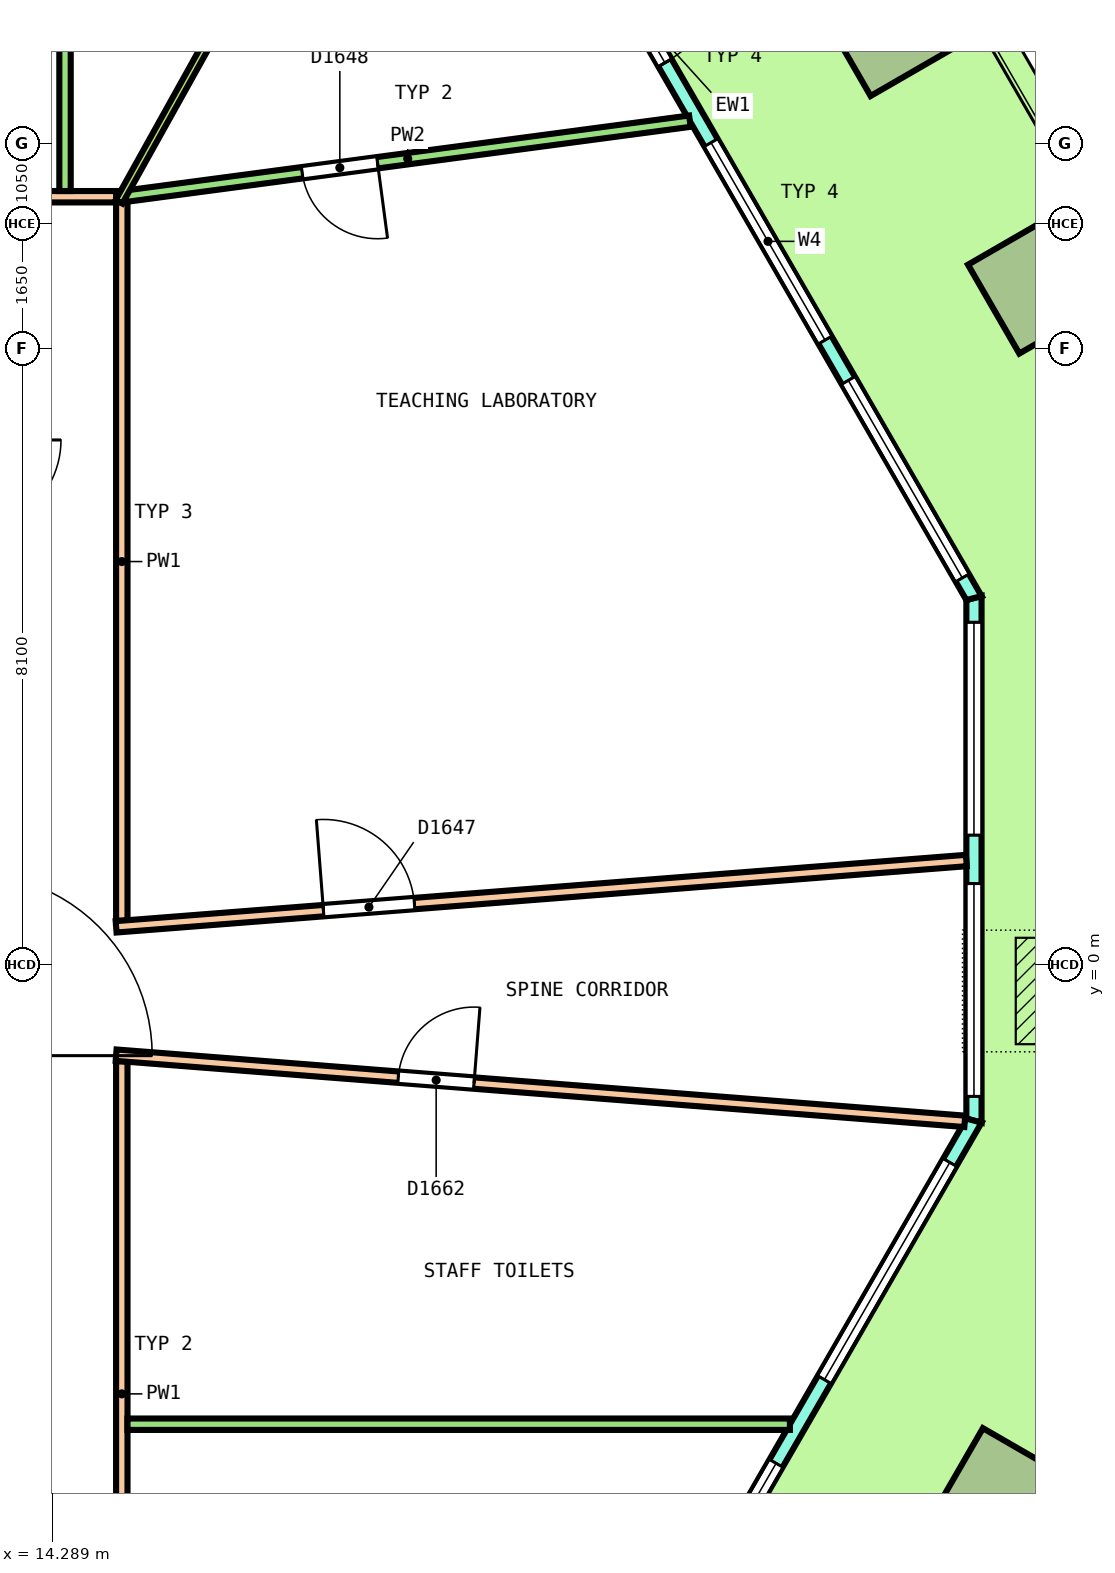
"""IFC4 building model, lengths in metres.
Left out: names, types, materials, properties, quantities, classifications, styles, units other than length and angle.
Written with IfcOpenShell. Run it as: python <this file> out.ifc"""

import sys

from ifc_helpers import new_model, si_unit, direction, frame, frame_2d, origin, origin_2d, place, context, subcontext, project, spatial, polyline, rectangle, outline, extrude, element, fill, save


model = new_model("IFC4")
c1 = context("Model", 3, precision=1e-05, world=origin(), true_north=direction((0.0, 1.0)))
c2 = subcontext(c1, "Body", "Model", "MODEL_VIEW")
j1 = project(units=[si_unit("LENGTHUNIT", "METRE"), si_unit("PLANEANGLEUNIT", "RADIAN")], contexts=[c1])
p1 = place(None, origin())
s1 = spatial("IfcSite", under=j1, at=p1, CompositionType="ELEMENT")
p2 = place(p1, origin())
s2 = spatial("IfcBuilding", under=s1, at=p2, CompositionType="ELEMENT")
p3 = place(p2, frame((0.0, 0.0, 126.4)))
s3 = spatial("IfcBuildingStorey", under=s2, at=p3, CompositionType="ELEMENT", Elevation=126.4)
for number, where, z_axis, x_axis in (
    (1, (27.255, 8.959, 0.0), (0.0, 0.0, 1.0), (-0.5, 0.866, 0.0)),
    (2, (25.299, 12.347, 0.0), (0.0, 0.0, 1.0), (-0.5, 0.866, 0.0)),
    (3, (26.776, -7.023, 0.0), (0.0, 0.0, 1.0), (0.5, 0.866, 0.0)),
):
    element("IfcColumn", number, at=place(p3, frame(where, z_axis=z_axis, x_axis=x_axis)), inside=s3, PredefinedType="COLUMN", context=c2, shape_type="SweptSolid", body=[
        extrude(rectangle(XDim=1.35, YDim=1.35, at=origin_2d()), origin(), (0.0, 0.0, 1.0), 4.05),
    ])
p4 = place(p3, frame((26.411, -2.055, 0.0), z_axis=(0.0, 0.0, 1.0), x_axis=(0.0, 1.0, 0.0)))
e4 = element("IfcWall", 4, at=p4, inside=s3, PredefinedType="SOLIDWALL", context=c2, shape_type="SweptSolid", body=[
    extrude(outline(polyline([(-0.027, -0.1), (1.128, -0.1), (2.283, -0.1), (3.438, -0.1), (4.592, -0.1), (5.747, -0.1), (6.902, -0.1), (6.848, 0.1), (5.711, 0.1), (4.574, 0.1), (3.438, 0.1), (2.301, 0.1), (1.164, 0.1), (0.027, 0.1), (-0.027, -0.1)])), origin(), (0.0, 0.0, 1.0), 4.1),
])
p5 = place(p4, frame((0.319, 0.0, 0.1)))
e5 = element("IfcOpeningElement", 5, at=p5, cuts=e4, PredefinedType="OPENING", context=c2, shape_type="SweptSolid", body=[
    extrude(rectangle(XDim=2.8, YDim=2.9, at=frame_2d((1.4, 1.45))), frame((0.0, 0.11, 0.0), z_axis=(0.0, -1.0, 0.0), x_axis=(1.0, 0.0, 0.0)), (0.0, 0.0, 1.0), 0.22),
])
p6 = place(p4, frame((3.756, 0.0, 0.1)))
e6 = element("IfcOpeningElement", 6, at=p6, cuts=e4, PredefinedType="OPENING", context=c2, shape_type="SweptSolid", body=[
    extrude(rectangle(XDim=2.8, YDim=2.9, at=frame_2d((1.4, 1.45))), frame((0.0, 0.11, 0.0), z_axis=(0.0, -1.0, 0.0), x_axis=(1.0, 0.0, 0.0)), (0.0, 0.0, 1.0), 0.22),
])
p7 = place(p3, frame((26.411, 4.82, 0.0), z_axis=(0.0, 0.0, 1.0), x_axis=(-0.500000137386, 0.866025324465, 0.0)))
e7 = element("IfcWall", 7, at=p7, inside=s3, PredefinedType="SOLIDWALL", context=c2, shape_type="SweptSolid", body=[
    extrude(outline(polyline([(-0.027, -0.1), (0.979, -0.1), (1.986, -0.1), (2.992, -0.1), (3.999, -0.1), (5.005, -0.1), (6.012, -0.1), (7.018, -0.1), (8.025, -0.1), (9.031, -0.1), (10.038, -0.1), (11.044, -0.1), (12.051, -0.1), (13.057, -0.1), (14.063, -0.1), (15.07, -0.1), (16.076, -0.1), (17.083, -0.1), (18.089, -0.1), (18.036, 0.1), (17.035, 0.1), (16.035, 0.1), (15.034, 0.1), (14.034, 0.1), (13.033, 0.1), (12.033, 0.1), (11.032, 0.1), (10.032, 0.1), (9.031, 0.1), (8.031, 0.1), (7.03, 0.1), (6.03, 0.1), (5.029, 0.1), (4.029, 0.1), (3.028, 0.1), (2.028, 0.1), (1.027, 0.1), (0.027, 0.1), (-0.027, -0.1)])), origin(), (0.0, 0.0, 1.0), 4.1),
])
p8 = place(p7, frame((0.306, 0.0, 0.1)))
e8 = element("IfcOpeningElement", 8, at=p8, cuts=e7, PredefinedType="OPENING", context=c2, shape_type="SweptSolid", body=[
    extrude(rectangle(XDim=3.0, YDim=2.9, at=frame_2d((1.5, 1.45))), frame((0.0, 0.11, 0.0), z_axis=(0.0, -1.0, 0.0), x_axis=(1.0, 0.0, 0.0)), (0.0, 0.0, 1.0), 0.22),
])
p9 = place(p7, frame((3.919, 0.0, 0.1)))
e9 = element("IfcOpeningElement", 9, at=p9, cuts=e7, PredefinedType="OPENING", context=c2, shape_type="SweptSolid", body=[
    extrude(rectangle(XDim=3.0, YDim=2.9, at=frame_2d((1.5, 1.45))), frame((0.0, 0.11, 0.0), z_axis=(0.0, -1.0, 0.0), x_axis=(1.0, 0.0, 0.0)), (0.0, 0.0, 1.0), 0.22),
])
p10 = place(p7, frame((8.131, 0.0, 0.0)))
e10 = element("IfcOpeningElement", 10, at=p10, cuts=e7, PredefinedType="OPENING", context=c2, shape_type="SweptSolid", body=[
    extrude(rectangle(XDim=1.8, YDim=2.4, at=frame_2d((0.9, 1.2))), frame((0.0, 0.11, 0.0), z_axis=(0.0, -1.0, 0.0), x_axis=(1.0, 0.0, 0.0)), (0.0, 0.0, 1.0), 0.22),
])
p11 = place(p7, frame((8.131, 0.0, 2.55)))
e11 = element("IfcOpeningElement", 11, at=p11, cuts=e7, PredefinedType="OPENING", context=c2, shape_type="SweptSolid", body=[
    extrude(rectangle(XDim=1.8, YDim=0.45, at=frame_2d((0.9, 0.225))), frame((0.0, 0.11, 0.0), z_axis=(0.0, -1.0, 0.0), x_axis=(1.0, 0.0, 0.0)), (0.0, 0.0, 1.0), 0.22),
])
p12 = place(p7, frame((11.144, 0.0, 0.1)))
e12 = element("IfcOpeningElement", 12, at=p12, cuts=e7, PredefinedType="OPENING", context=c2, shape_type="SweptSolid", body=[
    extrude(rectangle(XDim=3.0, YDim=2.9, at=frame_2d((1.5, 1.45))), frame((0.0, 0.11, 0.0), z_axis=(0.0, -1.0, 0.0), x_axis=(1.0, 0.0, 0.0)), (0.0, 0.0, 1.0), 0.22),
])
p13 = place(p7, frame((14.756, 0.0, 0.1)))
e13 = element("IfcOpeningElement", 13, at=p13, cuts=e7, PredefinedType="OPENING", context=c2, shape_type="SweptSolid", body=[
    extrude(rectangle(XDim=3.0, YDim=2.9, at=frame_2d((1.5, 1.45))), frame((0.0, 0.11, 0.0), z_axis=(0.0, -1.0, 0.0), x_axis=(1.0, 0.0, 0.0)), (0.0, 0.0, 1.0), 0.22),
])
p14 = place(p3, frame((14.985, -21.845, 0.0), z_axis=(0.0, 0.0, 1.0), x_axis=(0.50000204422, 0.86602422355, 0.0)))
e14 = element("IfcWall", 14, at=p14, inside=s3, PredefinedType="SOLIDWALL", context=c2, shape_type="SweptSolid", body=[
    extrude(outline(polyline([(-0.027, -0.1), (1.014, -0.1), (2.055, -0.1), (3.097, -0.1), (4.138, -0.1), (5.179, -0.1), (6.22, -0.1), (7.261, -0.1), (8.303, -0.1), (9.344, -0.1), (10.385, -0.1), (11.426, -0.1), (12.468, -0.1), (13.509, -0.1), (14.55, -0.1), (15.591, -0.1), (16.632, -0.1), (17.673, -0.1), (18.715, -0.1), (19.756, -0.1), (20.797, -0.1), (21.838, -0.1), (22.879, -0.1), (22.826, 0.1), (21.789, 0.1), (20.753, 0.1), (19.717, 0.1), (18.68, 0.1), (17.644, 0.1), (16.608, 0.1), (15.572, 0.1), (14.535, 0.1), (13.499, 0.1), (12.463, 0.1), (11.426, 0.1), (10.39, 0.1), (9.354, 0.1), (8.317, 0.1), (7.281, 0.1), (6.245, 0.1), (5.208, 0.1), (4.172, 0.1), (3.136, 0.1), (2.099, 0.1), (1.063, 0.1), (0.027, 0.1), (-0.027, -0.1)])), origin(), (0.0, 0.0, 1.0), 4.1),
])
p15 = place(p14, frame((0.635, 0.0, 0.1)))
e15 = element("IfcOpeningElement", 15, at=p15, cuts=e14, PredefinedType="OPENING", context=c2, shape_type="SweptSolid", body=[
    extrude(rectangle(XDim=3.3, YDim=2.9, at=frame_2d((1.65, 1.45))), frame((0.0, 0.11, 0.0), z_axis=(0.0, -1.0, 0.0), x_axis=(1.0, 0.0, 0.0)), (0.0, 0.0, 1.0), 0.22),
])
p16 = place(p14, frame((5.206, 0.0, 0.1)))
e16 = element("IfcOpeningElement", 16, at=p16, cuts=e14, PredefinedType="OPENING", context=c2, shape_type="SweptSolid", body=[
    extrude(rectangle(XDim=3.3, YDim=2.9, at=frame_2d((1.65, 1.45))), frame((0.0, 0.11, 0.0), z_axis=(0.0, -1.0, 0.0), x_axis=(1.0, 0.0, 0.0)), (0.0, 0.0, 1.0), 0.22),
])
p17 = place(p14, frame((10.526, 0.0, 0.0)))
e17 = element("IfcOpeningElement", 17, at=p17, cuts=e14, PredefinedType="OPENING", context=c2, shape_type="SweptSolid", body=[
    extrude(rectangle(XDim=1.8, YDim=2.4, at=frame_2d((0.9, 1.2))), frame((0.0, 0.11, 0.0), z_axis=(0.0, -1.0, 0.0), x_axis=(1.0, 0.0, 0.0)), (0.0, 0.0, 1.0), 0.22),
])
p18 = place(p14, frame((10.526, 0.0, 2.55)))
e18 = element("IfcOpeningElement", 18, at=p18, cuts=e14, PredefinedType="OPENING", context=c2, shape_type="SweptSolid", body=[
    extrude(rectangle(XDim=1.8, YDim=0.45, at=frame_2d((0.9, 0.225))), frame((0.0, 0.11, 0.0), z_axis=(0.0, -1.0, 0.0), x_axis=(1.0, 0.0, 0.0)), (0.0, 0.0, 1.0), 0.22),
])
p19 = place(p14, frame((14.347, 0.0, 0.1)))
e19 = element("IfcOpeningElement", 19, at=p19, cuts=e14, PredefinedType="OPENING", context=c2, shape_type="SweptSolid", body=[
    extrude(rectangle(XDim=3.3, YDim=2.9, at=frame_2d((1.65, 1.45))), frame((0.0, 0.11, 0.0), z_axis=(0.0, -1.0, 0.0), x_axis=(1.0, 0.0, 0.0)), (0.0, 0.0, 1.0), 0.22),
])
p20 = place(p14, frame((18.917, 0.0, 0.1)))
e20 = element("IfcOpeningElement", 20, at=p20, cuts=e14, PredefinedType="OPENING", context=c2, shape_type="SweptSolid", body=[
    extrude(rectangle(XDim=3.3, YDim=2.9, at=frame_2d((1.65, 1.45))), frame((0.0, 0.11, 0.0), z_axis=(0.0, -1.0, 0.0), x_axis=(1.0, 0.0, 0.0)), (0.0, 0.0, 1.0), 0.22),
])
p21 = place(p3, frame((15.2, -10.025, 0.0), z_axis=(0.0, 0.0, 1.0), x_axis=(0.0, 1.0, 0.0)))
e21 = element("IfcWall", 21, at=p21, inside=s3, PredefinedType="PARTITIONING", context=c2, shape_type="SweptSolid", body=[
    extrude(rectangle(XDim=8.75, YDim=0.15, at=frame_2d((4.375, 0.0))), origin(), (0.0, 0.0, 1.0), 3.05),
])
p22 = place(p21, frame((0.813, 0.0, 0.0)))
e22 = element("IfcOpeningElement", 22, at=p22, cuts=e21, PredefinedType="OPENING", context=c2, shape_type="SweptSolid", body=[
    extrude(rectangle(XDim=1.2, YDim=2.1, at=frame_2d((0.6, 1.05))), frame((0.0, 0.085, 0.0), z_axis=(0.0, -1.0, 0.0), x_axis=(1.0, 0.0, 0.0)), (0.0, 0.0, 1.0), 0.17),
])
p23 = place(p3, frame((15.2, 0.576, 0.0), z_axis=(0.0, 0.0, 1.0), x_axis=(0.0, 1.0, 0.0)))
e23 = element("IfcWall", 23, at=p23, inside=s3, PredefinedType="PARTITIONING", context=c2, shape_type="SweptSolid", body=[
    extrude(rectangle(XDim=9.449, YDim=0.15, at=frame_2d((4.725, 0.0))), origin(), (0.0, 0.0, 1.0), 3.05),
])
p24 = place(p3, frame((-15.125, 10.1, 0.0), z_axis=(0.0, 0.0, 1.0), x_axis=(1.0, 0.0, 0.0)))
e24 = element("IfcWall", 24, at=p24, inside=s3, PredefinedType="PARTITIONING", context=c2, shape_type="SweptSolid", body=[
    extrude(rectangle(XDim=30.25, YDim=0.15, at=frame_2d((15.125, 0.0))), origin(), (0.0, 0.0, 1.0), 3.05),
])
p25 = place(p24, frame((16.895, 0.0, 0.0)))
e25 = element("IfcOpeningElement", 25, at=p25, cuts=e24, PredefinedType="OPENING", context=c2, shape_type="SweptSolid", body=[
    extrude(rectangle(XDim=1.2, YDim=2.1, at=frame_2d((0.6, 1.05))), frame((0.0, 0.085, 0.0), z_axis=(0.0, -1.0, 0.0), x_axis=(1.0, 0.0, 0.0)), (0.0, 0.0, 1.0), 0.17),
])
p26 = place(p24, frame((6.564, 0.0, 0.0)))
e26 = element("IfcOpeningElement", 26, at=p26, cuts=e24, PredefinedType="OPENING", context=c2, shape_type="SweptSolid", body=[
    extrude(rectangle(XDim=1.2, YDim=2.1, at=frame_2d((0.6, 1.05))), frame((0.0, 0.085, 0.0), z_axis=(0.0, -1.0, 0.0), x_axis=(1.0, 0.0, 0.0)), (0.0, 0.0, 1.0), 0.17),
])
p27 = place(p24, frame((1.476, 0.0, 0.0)))
e27 = element("IfcOpeningElement", 27, at=p27, cuts=e24, PredefinedType="OPENING", context=c2, shape_type="SweptSolid", body=[
    extrude(rectangle(XDim=1.2, YDim=2.1, at=frame_2d((0.6, 1.05))), frame((0.0, 0.085, 0.0), z_axis=(0.0, -1.0, 0.0), x_axis=(1.0, 0.0, 0.0)), (0.0, 0.0, 1.0), 0.17),
])
p28 = place(p3, frame((15.125, 0.495, 0.0), z_axis=(0.0, 0.0, 1.0), x_axis=(0.996973035288, 0.07774809907, 0.0)))
e28 = element("IfcWall", 28, at=p28, inside=s3, PredefinedType="PARTITIONING", context=c2, shape_type="SweptSolid", body=[
    extrude(rectangle(XDim=11.22, YDim=0.15, at=frame_2d((5.61, 0.0))), origin(), (0.0, 0.0, 1.0), 3.05),
])
p29 = place(p28, frame((2.736, 0.0, 0.0)))
e29 = element("IfcOpeningElement", 29, at=p29, cuts=e28, PredefinedType="OPENING", context=c2, shape_type="SweptSolid", body=[
    extrude(rectangle(XDim=1.2, YDim=2.1, at=frame_2d((0.6, 1.05))), frame((0.0, 0.085, 0.0), z_axis=(0.0, -1.0, 0.0), x_axis=(1.0, 0.0, 0.0)), (0.0, 0.0, 1.0), 0.17),
])
p30 = place(p3, frame((15.125, -1.194, 0.0), z_axis=(0.0, 0.0, 1.0), x_axis=(0.996973662759, -0.07774005251, 0.0)))
e30 = element("IfcWall", 30, at=p30, inside=s3, PredefinedType="PARTITIONING", context=c2, shape_type="SweptSolid", body=[
    extrude(rectangle(XDim=11.199, YDim=0.15, at=frame_2d((5.6, 0.0))), origin(), (0.0, 0.0, 1.0), 3.05),
])
p31 = place(p30, frame((3.723, 0.0, 0.0)))
e31 = element("IfcOpeningElement", 31, at=p31, cuts=e30, PredefinedType="OPENING", context=c2, shape_type="SweptSolid", body=[
    extrude(rectangle(XDim=1.0, YDim=2.1, at=frame_2d((0.5, 1.05))), frame((0.0, 0.085, 0.0), z_axis=(0.0, -1.0, 0.0), x_axis=(1.0, 0.0, 0.0)), (0.0, 0.0, 1.0), 0.17),
])
p32 = place(p3, frame((15.25, 10.107, 0.0), z_axis=(0.0, 0.0, 1.0), x_axis=(0.991272259153, 0.131830604315, 0.0)))
e32 = element("IfcWall", 32, at=p32, inside=s3, PredefinedType="PARTITIONING", context=c2, shape_type="SweptSolid", body=[
    extrude(rectangle(XDim=7.489, YDim=0.15, at=frame_2d((3.745, 0.0))), origin(), (0.0, 0.0, 1.0), 3.05),
])
p33 = place(p32, frame((2.344, 0.0, 0.0)))
e33 = element("IfcOpeningElement", 33, at=p33, cuts=e32, PredefinedType="OPENING", context=c2, shape_type="SweptSolid", body=[
    extrude(rectangle(XDim=1.0, YDim=2.1, at=frame_2d((0.5, 1.05))), frame((0.0, 0.085, 0.0), z_axis=(0.0, -1.0, 0.0), x_axis=(1.0, 0.0, 0.0)), (0.0, 0.0, 1.0), 0.17),
])
p34 = place(p3, frame((14.453, 10.175, 0.0), z_axis=(0.0, 0.0, 1.0), x_axis=(0.0, 1.0, 0.0)))
e34 = element("IfcWall", 34, at=p34, inside=s3, PredefinedType="PARTITIONING", context=c2, shape_type="SweptSolid", body=[
    extrude(rectangle(XDim=11.862, YDim=0.15, at=frame_2d((5.931, 0.0))), origin(), (0.0, 0.0, 1.0), 3.05),
])
p35 = place(p3, frame((15.275, -6.049, 0.0), z_axis=(0.0, 0.0, 1.0), x_axis=(1.0, 0.0, 0.0)))
e35 = element("IfcWall", 35, at=p35, inside=s3, PredefinedType="PARTITIONING", context=c2, shape_type="SweptSolid", body=[
    extrude(rectangle(XDim=8.715, YDim=0.15, at=frame_2d((4.357, 0.0))), origin(), (0.0, 0.0, 1.0), 3.05),
])
p36 = place(p3, frame((15.164, 10.034, 0.0), z_axis=(0.0, 0.0, 1.0), x_axis=(0.486568356271, 0.873642509655, 0.0)))
e36 = element("IfcWall", 36, at=p36, inside=s3, PredefinedType="PARTITIONING", context=c2, shape_type="SweptSolid", body=[
    extrude(rectangle(XDim=8.196, YDim=0.1, at=frame_2d((4.098, 0.0))), origin(), (0.0, 0.0, 1.0), 3.05),
])
p37 = place(p36, frame((3.635, 0.0, 0.0)))
e37 = element("IfcOpeningElement", 37, at=p37, cuts=e36, PredefinedType="OPENING", context=c2, shape_type="SweptSolid", body=[
    extrude(rectangle(XDim=1.0, YDim=2.1, at=frame_2d((0.5, 1.05))), frame((0.0, 0.06, 0.0), z_axis=(0.0, -1.0, 0.0), x_axis=(1.0, 0.0, 0.0)), (0.0, 0.0, 1.0), 0.12),
])
p38 = place(p5, origin())
e38 = element("IfcWindow", 38, at=p38, inside=s3, PartitioningType="SINGLE_PANEL", PredefinedType="WINDOW", context=c2, shape_type="SweptSolid", body=[
    extrude(rectangle(XDim=2.8, YDim=2.9, at=frame_2d((1.4, 1.45))), frame((0.0, 0.03, 0.0), z_axis=(0.0, -1.0, 0.0), x_axis=(1.0, 0.0, 0.0)), (0.0, 0.0, 1.0), 0.06),
])
fill(e5, e38)
p39 = place(p6, origin())
e39 = element("IfcWindow", 39, at=p39, inside=s3, PartitioningType="SINGLE_PANEL", PredefinedType="WINDOW", context=c2, shape_type="SweptSolid", body=[
    extrude(rectangle(XDim=2.8, YDim=2.9, at=frame_2d((1.4, 1.45))), frame((0.0, 0.03, 0.0), z_axis=(0.0, -1.0, 0.0), x_axis=(1.0, 0.0, 0.0)), (0.0, 0.0, 1.0), 0.06),
])
fill(e6, e39)
p40 = place(p8, origin())
e40 = element("IfcWindow", 40, at=p40, inside=s3, PartitioningType="SINGLE_PANEL", PredefinedType="WINDOW", context=c2, shape_type="SweptSolid", body=[
    extrude(rectangle(XDim=3.0, YDim=2.9, at=frame_2d((1.5, 1.45))), frame((0.0, 0.03, 0.0), z_axis=(0.0, -1.0, 0.0), x_axis=(1.0, 0.0, 0.0)), (0.0, 0.0, 1.0), 0.06),
])
fill(e8, e40)
p41 = place(p9, origin())
e41 = element("IfcWindow", 41, at=p41, inside=s3, PartitioningType="SINGLE_PANEL", PredefinedType="WINDOW", context=c2, shape_type="SweptSolid", body=[
    extrude(rectangle(XDim=3.0, YDim=2.9, at=frame_2d((1.5, 1.45))), frame((0.0, 0.03, 0.0), z_axis=(0.0, -1.0, 0.0), x_axis=(1.0, 0.0, 0.0)), (0.0, 0.0, 1.0), 0.06),
])
fill(e9, e41)
p42 = place(p10, origin())
e42 = element("IfcDoor", 42, at=p42, inside=s3, OperationType="DOUBLE_DOOR_SINGLE_SWING", PredefinedType="DOOR", context=c2, shape_type="SweptSolid", body=[
    extrude(rectangle(XDim=1.8, YDim=2.4, at=frame_2d((0.9, 1.2))), frame((0.0, 0.025, 0.0), z_axis=(0.0, -1.0, 0.0), x_axis=(1.0, 0.0, 0.0)), (0.0, 0.0, 1.0), 0.05),
])
fill(e10, e42)
p43 = place(p11, origin())
e43 = element("IfcWindow", 43, at=p43, inside=s3, PartitioningType="SINGLE_PANEL", PredefinedType="WINDOW", context=c2, shape_type="SweptSolid", body=[
    extrude(rectangle(XDim=1.8, YDim=0.45, at=frame_2d((0.9, 0.225))), frame((0.0, 0.03, 0.0), z_axis=(0.0, -1.0, 0.0), x_axis=(1.0, 0.0, 0.0)), (0.0, 0.0, 1.0), 0.06),
])
fill(e11, e43)
p44 = place(p19, origin())
e44 = element("IfcWindow", 44, at=p44, inside=s3, PartitioningType="SINGLE_PANEL", PredefinedType="WINDOW", context=c2, shape_type="SweptSolid", body=[
    extrude(rectangle(XDim=3.3, YDim=2.9, at=frame_2d((1.65, 1.45))), frame((0.0, 0.03, 0.0), z_axis=(0.0, -1.0, 0.0), x_axis=(1.0, 0.0, 0.0)), (0.0, 0.0, 1.0), 0.06),
])
fill(e19, e44)
p45 = place(p20, origin())
e45 = element("IfcWindow", 45, at=p45, inside=s3, PartitioningType="SINGLE_PANEL", PredefinedType="WINDOW", context=c2, shape_type="SweptSolid", body=[
    extrude(rectangle(XDim=3.3, YDim=2.9, at=frame_2d((1.65, 1.45))), frame((0.0, 0.03, 0.0), z_axis=(0.0, -1.0, 0.0), x_axis=(1.0, 0.0, 0.0)), (0.0, 0.0, 1.0), 0.06),
])
fill(e20, e45)
p46 = place(p29, origin())
e46 = element("IfcDoor", 46, at=p46, inside=s3, OperationType="DOUBLE_DOOR_SINGLE_SWING", PredefinedType="DOOR", context=c2, shape_type="SweptSolid", body=[
    extrude(rectangle(XDim=1.2, YDim=2.1, at=frame_2d((0.6, 1.05))), frame((0.0, 0.025, 0.0), z_axis=(0.0, -1.0, 0.0), x_axis=(1.0, 0.0, 0.0)), (0.0, 0.0, 1.0), 0.05),
])
fill(e29, e46)
p47 = place(p33, origin())
e47 = element("IfcDoor", 47, at=p47, inside=s3, OperationType="SINGLE_SWING_RIGHT", PredefinedType="DOOR", context=c2, shape_type="SweptSolid", body=[
    extrude(rectangle(XDim=1.0, YDim=2.1, at=frame_2d((0.5, 1.05))), frame((0.0, 0.025, 0.0), z_axis=(0.0, -1.0, 0.0), x_axis=(1.0, 0.0, 0.0)), (0.0, 0.0, 1.0), 0.05),
])
fill(e33, e47)
p48 = place(p31, origin())
e48 = element("IfcDoor", 48, at=p48, inside=s3, OperationType="SINGLE_SWING_RIGHT", PredefinedType="DOOR", context=c2, shape_type="SweptSolid", body=[
    extrude(rectangle(XDim=1.0, YDim=2.1, at=frame_2d((0.5, 1.05))), frame((0.0, 0.025, 0.0), z_axis=(0.0, -1.0, 0.0), x_axis=(1.0, 0.0, 0.0)), (0.0, 0.0, 1.0), 0.05),
])
fill(e31, e48)
save(model, sys.argv[1])
